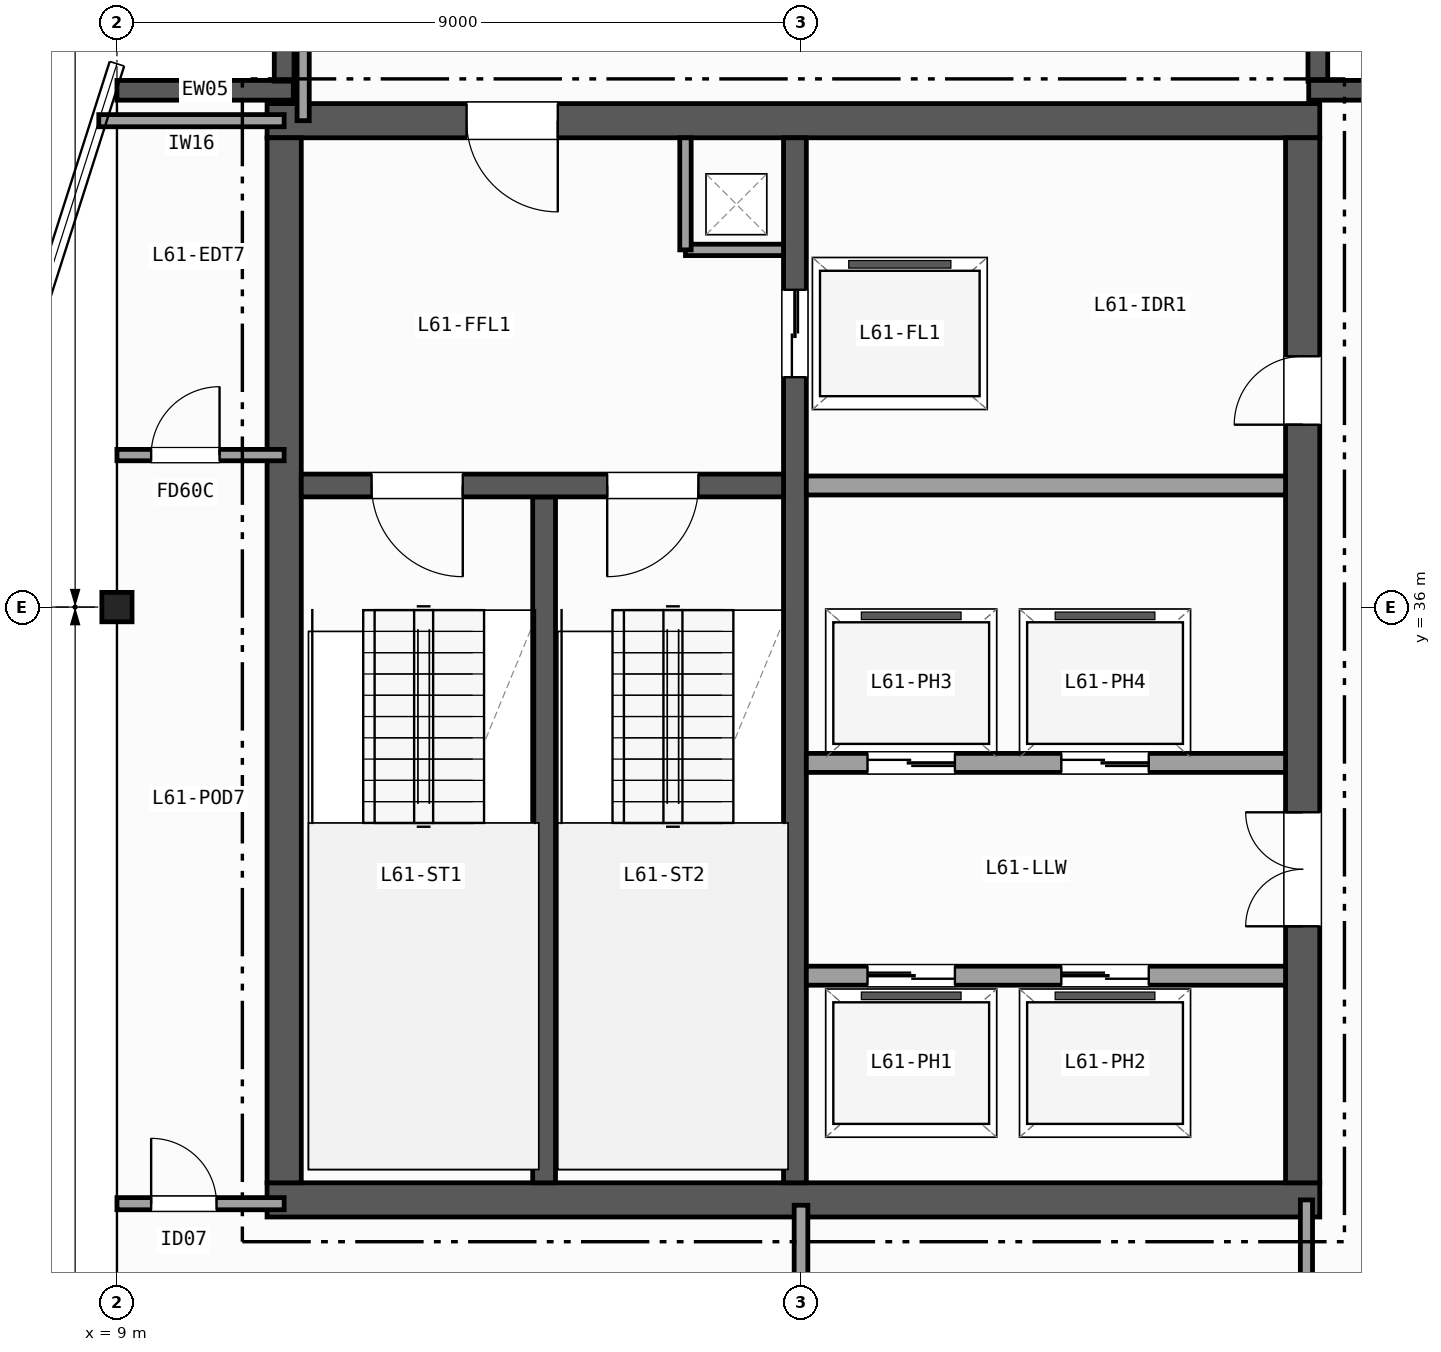
"""IFC4 building model, lengths in metres.
Left out: names, types, materials, properties, quantities, classifications, styles, units other than length and angle.
Written with IfcOpenShell. Run it as: python <this file> out.ifc"""

import sys

from ifc_helpers import new_model, si_unit, direction, frame, frame_2d, origin, origin_2d, place, context, subcontext, project, spatial, rectangle, i_section, extrude, element, fill, save


model = new_model("IFC4")
c1 = context("Model", 3, precision=1e-05, world=origin(), true_north=direction((0.0, 1.0)))
c2 = subcontext(c1, "Body", "Model", "MODEL_VIEW")
j1 = project(units=[si_unit("LENGTHUNIT", "METRE"), si_unit("PLANEANGLEUNIT", "RADIAN")], contexts=[c1])
p1 = place(None, origin())
s1 = spatial("IfcSite", under=j1, at=p1, CompositionType="ELEMENT")
p2 = place(p1, origin())
s2 = spatial("IfcBuilding", under=s1, at=p2, CompositionType="ELEMENT")
p3 = place(p2, frame((0.0, 0.0, 244.5)))
s3 = spatial("IfcBuildingStorey", under=s2, at=p3, CompositionType="ELEMENT", Elevation=244.5)
p4 = place(p3, frame((9.0, 36.0, 0.0), z_axis=(0.0, 0.0, 1.0), x_axis=(1.0, 0.0, 0.0)))
e1 = element("IfcColumn", 1, at=p4, inside=s3, PredefinedType="COLUMN", context=c2, shape_type="SweptSolid", body=[
    extrude(i_section(OverallWidth=0.397, OverallDepth=0.387, WebThickness=0.021, FlangeThickness=0.033, FilletRadius=0.015, at=origin_2d()), origin(), (0.0, 0.0, 1.0), 3.7),
])
p5 = place(p3, frame((9.0, 42.8, 0.0), z_axis=(0.0, 0.0, 1.0), x_axis=(1.0, 0.0, 0.0)))
e2 = element("IfcWall", 2, at=p5, inside=s3, PredefinedType="SOLIDWALL", context=c2, shape_type="SweptSolid", body=[
    extrude(rectangle(XDim=2.32, YDim=0.26, at=frame_2d((1.16, 0.0))), origin(), (0.0, 0.0, 1.0), 3.42),
])
for number, where, z_axis, x_axis in (
    (3, (11.2, 42.92, 0.0), (0.0, 0.0, 1.0), (0.0, 1.0, 0.0)),
    (4, (24.8, 45.0, 0.0), (0.0, 0.0, 1.0), (0.0, -1.0, 0.0)),
):
    element("IfcWall", number, at=place(p3, frame(where, z_axis=z_axis, x_axis=x_axis)), inside=s3, PredefinedType="SOLIDWALL", context=c2, shape_type="SweptSolid", body=[
        extrude(rectangle(XDim=2.08, YDim=0.26, at=frame_2d((1.04, 0.0))), origin(), (0.0, 0.0, 1.0), 3.42),
    ])
p6 = place(p3, frame((24.68, 42.8, 0.0), z_axis=(0.0, 0.0, 1.0), x_axis=(1.0, 0.0, 0.0)))
e5 = element("IfcWall", 5, at=p6, inside=s3, PredefinedType="SOLIDWALL", context=c2, shape_type="SweptSolid", body=[
    extrude(rectangle(XDim=2.32, YDim=0.26, at=frame_2d((1.16, 0.0))), origin(), (0.0, 0.0, 1.0), 3.42),
])
p7 = place(p3, frame((10.975, 28.2, 0.0), z_axis=(0.0, 0.0, 1.0), x_axis=(1.0, 0.0, 0.0)))
e6 = element("IfcWall", 6, at=p7, inside=s3, PredefinedType="SHEAR", context=c2, shape_type="SweptSolid", body=[
    extrude(rectangle(XDim=13.85, YDim=0.45, at=frame_2d((6.925, 0.0))), origin(), (0.0, 0.0, 1.0), 3.42),
])
p8 = place(p3, frame((24.825, 42.4, 0.0), z_axis=(0.0, 0.0, 1.0), x_axis=(-1.0, 0.0, 0.0)))
e7 = element("IfcWall", 7, at=p8, inside=s3, PredefinedType="SHEAR", context=c2, shape_type="SweptSolid", body=[
    extrude(rectangle(XDim=13.85, YDim=0.45, at=frame_2d((6.925, 0.0))), origin(), (0.0, 0.0, 1.0), 3.42),
])
p9 = place(p8, frame((10.025, 0.0, 0.0)))
e8 = element("IfcOpeningElement", 8, at=p9, cuts=e7, PredefinedType="OPENING", context=c2, shape_type="SweptSolid", body=[
    extrude(rectangle(XDim=1.2, YDim=2.15, at=frame_2d((0.6, 1.075))), frame((0.0, 0.235, 0.0), z_axis=(0.0, -1.0, 0.0), x_axis=(1.0, 0.0, 0.0)), (0.0, 0.0, 1.0), 0.47),
])
p10 = place(p3, frame((11.2, 42.175, 0.0), z_axis=(0.0, 0.0, 1.0), x_axis=(0.0, -1.0, 0.0)))
e9 = element("IfcWall", 9, at=p10, inside=s3, PredefinedType="SHEAR", context=c2, shape_type="SweptSolid", body=[
    extrude(rectangle(XDim=13.75, YDim=0.45, at=frame_2d((6.875, 0.0))), origin(), (0.0, 0.0, 1.0), 3.42),
])
p11 = place(p3, frame((24.6, 28.425, 0.0), z_axis=(0.0, 0.0, 1.0), x_axis=(0.0, 1.0, 0.0)))
e10 = element("IfcWall", 10, at=p11, inside=s3, PredefinedType="SHEAR", context=c2, shape_type="SweptSolid", body=[
    extrude(rectangle(XDim=13.75, YDim=0.45, at=frame_2d((6.875, 0.0))), origin(), (0.0, 0.0, 1.0), 3.42),
])
p12 = place(p11, frame((3.375, 0.0, 0.0)))
e11 = element("IfcOpeningElement", 11, at=p12, cuts=e10, PredefinedType="OPENING", context=c2, shape_type="SweptSolid", body=[
    extrude(rectangle(XDim=1.5, YDim=2.2, at=frame_2d((0.75, 1.1))), frame((0.0, 0.235, 0.0), z_axis=(0.0, -1.0, 0.0), x_axis=(1.0, 0.0, 0.0)), (0.0, 0.0, 1.0), 0.47),
])
p13 = place(p11, frame((9.975, 0.0, 0.0)))
e12 = element("IfcOpeningElement", 12, at=p13, cuts=e10, PredefinedType="OPENING", context=c2, shape_type="SweptSolid", body=[
    extrude(rectangle(XDim=0.9, YDim=2.1, at=frame_2d((0.45, 1.05))), frame((0.0, 0.235, 0.0), z_axis=(0.0, -1.0, 0.0), x_axis=(1.0, 0.0, 0.0)), (0.0, 0.0, 1.0), 0.47),
])
p14 = place(p3, frame((14.62, 28.425, 0.0), z_axis=(0.0, 0.0, 1.0), x_axis=(0.0, 1.0, 0.0)))
e13 = element("IfcWall", 13, at=p14, inside=s3, PredefinedType="SHEAR", context=c2, shape_type="SweptSolid", body=[
    extrude(rectangle(XDim=9.025, YDim=0.3, at=frame_2d((4.512, 0.0))), origin(), (0.0, 0.0, 1.0), 3.42),
])
p15 = place(p3, frame((17.92, 42.175, 0.0), z_axis=(0.0, 0.0, 1.0), x_axis=(0.0, -1.0, 0.0)))
e14 = element("IfcWall", 14, at=p15, inside=s3, PredefinedType="SHEAR", context=c2, shape_type="SweptSolid", body=[
    extrude(rectangle(XDim=13.75, YDim=0.3, at=frame_2d((6.875, 0.0))), origin(), (0.0, 0.0, 1.0), 3.42),
])
p16 = place(p15, frame((2.0, 0.0, 0.0)))
e15 = element("IfcOpeningElement", 15, at=p16, cuts=e14, PredefinedType="OPENING", context=c2, shape_type="SweptSolid", body=[
    extrude(rectangle(XDim=1.15, YDim=2.15, at=frame_2d((0.575, 1.075))), frame((0.0, 0.16, 0.0), z_axis=(0.0, -1.0, 0.0), x_axis=(1.0, 0.0, 0.0)), (0.0, 0.0, 1.0), 0.32),
])
p17 = place(p3, frame((17.77, 37.6, 0.0), z_axis=(0.0, 0.0, 1.0), x_axis=(-1.0, 0.0, 0.0)))
e16 = element("IfcWall", 16, at=p17, inside=s3, PredefinedType="SHEAR", context=c2, shape_type="SweptSolid", body=[
    extrude(rectangle(XDim=6.345, YDim=0.3, at=frame_2d((3.172, 0.0))), origin(), (0.0, 0.0, 1.0), 3.42),
])
p18 = place(p17, frame((4.22, 0.0, 0.0)))
e17 = element("IfcOpeningElement", 17, at=p18, cuts=e16, PredefinedType="OPENING", context=c2, shape_type="SweptSolid", body=[
    extrude(rectangle(XDim=1.2, YDim=2.15, at=frame_2d((0.6, 1.075))), frame((0.0, 0.16, 0.0), z_axis=(0.0, -1.0, 0.0), x_axis=(1.0, 0.0, 0.0)), (0.0, 0.0, 1.0), 0.32),
])
p19 = place(p17, frame((1.12, 0.0, 0.0)))
e18 = element("IfcOpeningElement", 18, at=p19, cuts=e16, PredefinedType="OPENING", context=c2, shape_type="SweptSolid", body=[
    extrude(rectangle(XDim=1.2, YDim=2.15, at=frame_2d((0.6, 1.075))), frame((0.0, 0.16, 0.0), z_axis=(0.0, -1.0, 0.0), x_axis=(1.0, 0.0, 0.0)), (0.0, 0.0, 1.0), 0.32),
])
p20 = place(p3, frame((16.48, 40.7, 0.0), z_axis=(0.0, 0.0, 1.0), x_axis=(1.0, 0.0, 0.0)))
e19 = element("IfcWall", 19, at=p20, inside=s3, PredefinedType="PARTITIONING", context=c2, shape_type="SweptSolid", body=[
    extrude(rectangle(XDim=1.29, YDim=0.15, at=frame_2d((0.645, 0.0))), origin(), (0.0, 0.0, 1.0), 3.42),
])
p21 = place(p3, frame((16.48, 40.7, 0.0), z_axis=(0.0, 0.0, 1.0), x_axis=(0.0, 1.0, 0.0)))
e20 = element("IfcWall", 20, at=p21, inside=s3, PredefinedType="PARTITIONING", context=c2, shape_type="SweptSolid", body=[
    extrude(rectangle(XDim=1.475, YDim=0.15, at=frame_2d((0.738, 0.0))), origin(), (0.0, 0.0, 1.0), 3.42),
])
p22 = place(p3, frame((18.07, 37.6, 0.0), z_axis=(0.0, 0.0, 1.0), x_axis=(1.0, 0.0, 0.0)))
e21 = element("IfcWall", 21, at=p22, inside=s3, PredefinedType="PARTITIONING", context=c2, shape_type="SweptSolid", body=[
    extrude(rectangle(XDim=6.305, YDim=0.25, at=frame_2d((3.152, 0.0))), origin(), (0.0, 0.0, 1.0), 3.42),
])
p23 = place(p3, frame((18.07, 31.15, 0.0), z_axis=(0.0, 0.0, 1.0), x_axis=(1.0, 0.0, 0.0)))
e22 = element("IfcWall", 22, at=p23, inside=s3, PredefinedType="PARTITIONING", context=c2, shape_type="SweptSolid", body=[
    extrude(rectangle(XDim=6.305, YDim=0.25, at=frame_2d((3.152, 0.0))), origin(), (0.0, 0.0, 1.0), 3.42),
])
p24 = place(p23, frame((0.805, 0.0, 0.0)))
e23 = element("IfcOpeningElement", 23, at=p24, cuts=e22, PredefinedType="OPENING", context=c2, shape_type="SweptSolid", body=[
    extrude(rectangle(XDim=1.15, YDim=2.15, at=frame_2d((0.575, 1.075))), frame((0.0, 0.135, 0.0), z_axis=(0.0, -1.0, 0.0), x_axis=(1.0, 0.0, 0.0)), (0.0, 0.0, 1.0), 0.27),
])
p25 = place(p23, frame((3.355, 0.0, 0.0)))
e24 = element("IfcOpeningElement", 24, at=p25, cuts=e22, PredefinedType="OPENING", context=c2, shape_type="SweptSolid", body=[
    extrude(rectangle(XDim=1.15, YDim=2.15, at=frame_2d((0.575, 1.075))), frame((0.0, 0.135, 0.0), z_axis=(0.0, -1.0, 0.0), x_axis=(1.0, 0.0, 0.0)), (0.0, 0.0, 1.0), 0.27),
])
p26 = place(p3, frame((24.375, 33.95, 0.0), z_axis=(0.0, 0.0, 1.0), x_axis=(-1.0, 0.0, 0.0)))
e25 = element("IfcWall", 25, at=p26, inside=s3, PredefinedType="PARTITIONING", context=c2, shape_type="SweptSolid", body=[
    extrude(rectangle(XDim=6.305, YDim=0.25, at=frame_2d((3.152, 0.0))), origin(), (0.0, 0.0, 1.0), 3.42),
])
p27 = place(p26, frame((4.35, 0.0, 0.0)))
e26 = element("IfcOpeningElement", 26, at=p27, cuts=e25, PredefinedType="OPENING", context=c2, shape_type="SweptSolid", body=[
    extrude(rectangle(XDim=1.15, YDim=2.15, at=frame_2d((0.575, 1.075))), frame((0.0, 0.135, 0.0), z_axis=(0.0, -1.0, 0.0), x_axis=(1.0, 0.0, 0.0)), (0.0, 0.0, 1.0), 0.27),
])
p28 = place(p26, frame((1.8, 0.0, 0.0)))
e27 = element("IfcOpeningElement", 27, at=p28, cuts=e25, PredefinedType="OPENING", context=c2, shape_type="SweptSolid", body=[
    extrude(rectangle(XDim=1.15, YDim=2.15, at=frame_2d((0.575, 1.075))), frame((0.0, 0.135, 0.0), z_axis=(0.0, -1.0, 0.0), x_axis=(1.0, 0.0, 0.0)), (0.0, 0.0, 1.0), 0.27),
])
p29 = place(p3, frame((9.0, 28.15, 0.0), z_axis=(0.0, 0.0, 1.0), x_axis=(1.0, 0.0, 0.0)))
e28 = element("IfcWall", 28, at=p29, inside=s3, PredefinedType="PARTITIONING", context=c2, shape_type="SweptSolid", body=[
    extrude(rectangle(XDim=2.2, YDim=0.16, at=frame_2d((1.1, 0.0))), origin(), (0.0, 0.0, 1.0), 2.707),
])
p30 = place(p29, frame((0.45, 0.0, 0.0)))
e29 = element("IfcOpeningElement", 29, at=p30, cuts=e28, PredefinedType="OPENING", context=c2, shape_type="SweptSolid", body=[
    extrude(rectangle(XDim=0.86, YDim=2.05, at=frame_2d((0.43, 1.025))), frame((0.0, 0.09, 0.0), z_axis=(0.0, -1.0, 0.0), x_axis=(1.0, 0.0, 0.0)), (0.0, 0.0, 1.0), 0.18),
])
p31 = place(p3, frame((8.761, 42.4, 0.0), z_axis=(0.0, 0.0, 1.0), x_axis=(1.0, 0.0, 0.0)))
e30 = element("IfcWall", 30, at=p31, inside=s3, PredefinedType="PARTITIONING", context=c2, shape_type="SweptSolid", body=[
    extrude(rectangle(XDim=2.439, YDim=0.16, at=frame_2d((1.219, 0.0))), origin(), (0.0, 0.0, 1.0), 3.42),
])
p32 = place(p3, frame((11.45, 42.4, 0.0), z_axis=(0.0, 0.0, 1.0), x_axis=(0.0, 1.0, 0.0)))
e31 = element("IfcWall", 31, at=p32, inside=s3, PredefinedType="PARTITIONING", context=c2, shape_type="SweptSolid", body=[
    extrude(rectangle(XDim=2.666, YDim=0.16, at=frame_2d((1.333, 0.0))), origin(), (0.0, 0.0, 1.0), 3.42),
])
p33 = place(p3, frame((9.0, 38.0, 0.0), z_axis=(0.0, 0.0, 1.0), x_axis=(1.0, 0.0, 0.0)))
e32 = element("IfcWall", 32, at=p33, inside=s3, PredefinedType="PARTITIONING", context=c2, shape_type="SweptSolid", body=[
    extrude(rectangle(XDim=2.2, YDim=0.15, at=frame_2d((1.1, 0.0))), origin(), (0.0, 0.0, 1.0), 3.42),
])
p34 = place(p33, frame((0.45, 0.0, 0.0)))
e33 = element("IfcOpeningElement", 33, at=p34, cuts=e32, PredefinedType="OPENING", context=c2, shape_type="SweptSolid", body=[
    extrude(rectangle(XDim=0.9, YDim=2.1, at=frame_2d((0.45, 1.05))), frame((0.0, 0.085, 0.0), z_axis=(0.0, -1.0, 0.0), x_axis=(1.0, 0.0, 0.0)), (0.0, 0.0, 1.0), 0.17),
])
p35 = place(p3, frame((24.65, 9.0, 0.0), z_axis=(0.0, 0.0, 1.0), x_axis=(0.0, 1.0, 0.0)))
e34 = element("IfcWall", 34, at=p35, inside=s3, PredefinedType="PARTITIONING", context=c2, shape_type="SweptSolid", body=[
    extrude(rectangle(XDim=19.2, YDim=0.16, at=frame_2d((9.6, 0.0))), origin(), (0.0, 0.0, 1.0), 2.707),
])
p36 = place(p35, frame((3.2, 0.0, 0.0)))
e35 = element("IfcOpeningElement", 35, at=p36, cuts=e34, PredefinedType="OPENING", context=c2, shape_type="SweptSolid", body=[
    extrude(rectangle(XDim=1.0, YDim=2.1, at=frame_2d((0.5, 1.05))), frame((0.0, 0.09, 0.0), z_axis=(0.0, -1.0, 0.0), x_axis=(1.0, 0.0, 0.0)), (0.0, 0.0, 1.0), 0.18),
])
p37 = place(p35, frame((12.765, 0.0, 0.0)))
e36 = element("IfcOpeningElement", 36, at=p37, cuts=e34, PredefinedType="OPENING", context=c2, shape_type="SweptSolid", body=[
    extrude(rectangle(XDim=1.05, YDim=2.15, at=frame_2d((0.525, 1.075))), frame((0.0, 0.09, 0.0), z_axis=(0.0, -1.0, 0.0), x_axis=(1.0, 0.0, 0.0)), (0.0, 0.0, 1.0), 0.18),
])
p38 = place(p3, frame((18.0, 9.0, 0.0), z_axis=(0.0, 0.0, 1.0), x_axis=(0.0, 1.0, 0.0)))
e37 = element("IfcWall", 37, at=p38, inside=s3, PredefinedType="PARTITIONING", context=c2, shape_type="SweptSolid", body=[
    extrude(rectangle(XDim=19.13, YDim=0.18, at=frame_2d((9.565, 0.0))), origin(), (0.0, 0.0, 1.0), 2.707),
])
p39 = place(p38, frame((2.2, 0.0, 0.0)))
e38 = element("IfcOpeningElement", 38, at=p39, cuts=e37, PredefinedType="OPENING", context=c2, shape_type="SweptSolid", body=[
    extrude(rectangle(XDim=1.2, YDim=2.15, at=frame_2d((0.6, 1.075))), frame((0.0, 0.1, 0.0), z_axis=(0.0, -1.0, 0.0), x_axis=(1.0, 0.0, 0.0)), (0.0, 0.0, 1.0), 0.2),
])
p40 = place(p38, frame((13.5, 0.0, 0.0)))
e39 = element("IfcOpeningElement", 39, at=p40, cuts=e37, PredefinedType="OPENING", context=c2, shape_type="SweptSolid", body=[
    extrude(rectangle(XDim=0.86, YDim=2.05, at=frame_2d((0.43, 1.025))), frame((0.0, 0.1, 0.0), z_axis=(0.0, -1.0, 0.0), x_axis=(1.0, 0.0, 0.0)), (0.0, 0.0, 1.0), 0.2),
])
p41 = place(p18, origin())
e40 = element("IfcDoor", 40, at=p41, inside=s3, OperationType="SINGLE_SWING_LEFT", PredefinedType="DOOR", context=c2, shape_type="SweptSolid", body=[
    extrude(rectangle(XDim=1.2, YDim=2.15, at=frame_2d((0.6, 1.075))), frame((0.0, 0.025, 0.0), z_axis=(0.0, -1.0, 0.0), x_axis=(1.0, 0.0, 0.0)), (0.0, 0.0, 1.0), 0.05),
])
fill(e17, e40)
p42 = place(p19, origin())
e41 = element("IfcDoor", 41, at=p42, inside=s3, OperationType="SINGLE_SWING_RIGHT", PredefinedType="DOOR", context=c2, shape_type="SweptSolid", body=[
    extrude(rectangle(XDim=1.2, YDim=2.15, at=frame_2d((0.6, 1.075))), frame((0.0, 0.025, 0.0), z_axis=(0.0, -1.0, 0.0), x_axis=(1.0, 0.0, 0.0)), (0.0, 0.0, 1.0), 0.05),
])
fill(e18, e41)
p43 = place(p12, origin())
e42 = element("IfcDoor", 42, at=p43, inside=s3, OperationType="DOUBLE_DOOR_SINGLE_SWING", PredefinedType="DOOR", context=c2, shape_type="SweptSolid", body=[
    extrude(rectangle(XDim=1.5, YDim=2.2, at=frame_2d((0.75, 1.1))), frame((0.0, 0.025, 0.0), z_axis=(0.0, -1.0, 0.0), x_axis=(1.0, 0.0, 0.0)), (0.0, 0.0, 1.0), 0.05),
])
fill(e11, e42)
p44 = place(p9, origin())
e43 = element("IfcDoor", 43, at=p44, inside=s3, OperationType="SINGLE_SWING_LEFT", PredefinedType="DOOR", context=c2, shape_type="SweptSolid", body=[
    extrude(rectangle(XDim=1.2, YDim=2.15, at=frame_2d((0.6, 1.075))), frame((0.0, 0.025, 0.0), z_axis=(0.0, -1.0, 0.0), x_axis=(1.0, 0.0, 0.0)), (0.0, 0.0, 1.0), 0.05),
])
fill(e8, e43)
p45 = place(p13, origin())
e44 = element("IfcDoor", 44, at=p45, inside=s3, OperationType="SINGLE_SWING_LEFT", PredefinedType="DOOR", context=c2, shape_type="SweptSolid", body=[
    extrude(rectangle(XDim=0.9, YDim=2.1, at=frame_2d((0.45, 1.05))), frame((0.0, 0.025, 0.0), z_axis=(0.0, -1.0, 0.0), x_axis=(1.0, 0.0, 0.0)), (0.0, 0.0, 1.0), 0.05),
])
fill(e12, e44)
p46 = place(p16, origin())
e45 = element("IfcDoor", 45, at=p46, inside=s3, OperationType="DOUBLE_DOOR_SLIDING", PredefinedType="DOOR", context=c2, shape_type="SweptSolid", body=[
    extrude(rectangle(XDim=1.15, YDim=2.15, at=frame_2d((0.575, 1.075))), frame((0.0, 0.025, 0.0), z_axis=(0.0, -1.0, 0.0), x_axis=(1.0, 0.0, 0.0)), (0.0, 0.0, 1.0), 0.05),
])
fill(e15, e45)
p47 = place(p24, origin())
e46 = element("IfcDoor", 46, at=p47, inside=s3, OperationType="DOUBLE_DOOR_SLIDING", PredefinedType="DOOR", context=c2, shape_type="SweptSolid", body=[
    extrude(rectangle(XDim=1.15, YDim=2.15, at=frame_2d((0.575, 1.075))), frame((0.0, 0.025, 0.0), z_axis=(0.0, -1.0, 0.0), x_axis=(1.0, 0.0, 0.0)), (0.0, 0.0, 1.0), 0.05),
])
fill(e23, e46)
p48 = place(p25, origin())
e47 = element("IfcDoor", 47, at=p48, inside=s3, OperationType="DOUBLE_DOOR_SLIDING", PredefinedType="DOOR", context=c2, shape_type="SweptSolid", body=[
    extrude(rectangle(XDim=1.15, YDim=2.15, at=frame_2d((0.575, 1.075))), frame((0.0, 0.025, 0.0), z_axis=(0.0, -1.0, 0.0), x_axis=(1.0, 0.0, 0.0)), (0.0, 0.0, 1.0), 0.05),
])
fill(e24, e47)
p49 = place(p27, origin())
e48 = element("IfcDoor", 48, at=p49, inside=s3, OperationType="DOUBLE_DOOR_SLIDING", PredefinedType="DOOR", context=c2, shape_type="SweptSolid", body=[
    extrude(rectangle(XDim=1.15, YDim=2.15, at=frame_2d((0.575, 1.075))), frame((0.0, 0.025, 0.0), z_axis=(0.0, -1.0, 0.0), x_axis=(1.0, 0.0, 0.0)), (0.0, 0.0, 1.0), 0.05),
])
fill(e26, e48)
p50 = place(p28, origin())
e49 = element("IfcDoor", 49, at=p50, inside=s3, OperationType="DOUBLE_DOOR_SLIDING", PredefinedType="DOOR", context=c2, shape_type="SweptSolid", body=[
    extrude(rectangle(XDim=1.15, YDim=2.15, at=frame_2d((0.575, 1.075))), frame((0.0, 0.025, 0.0), z_axis=(0.0, -1.0, 0.0), x_axis=(1.0, 0.0, 0.0)), (0.0, 0.0, 1.0), 0.05),
])
fill(e27, e49)
p51 = place(p30, origin())
e50 = element("IfcDoor", 50, at=p51, inside=s3, OperationType="SINGLE_SWING_LEFT", PredefinedType="DOOR", context=c2, shape_type="SweptSolid", body=[
    extrude(rectangle(XDim=0.86, YDim=2.05, at=frame_2d((0.43, 1.025))), frame((0.0, 0.025, 0.0), z_axis=(0.0, -1.0, 0.0), x_axis=(1.0, 0.0, 0.0)), (0.0, 0.0, 1.0), 0.05),
])
fill(e29, e50)
p52 = place(p34, origin())
e51 = element("IfcDoor", 51, at=p52, inside=s3, OperationType="SINGLE_SWING_RIGHT", PredefinedType="DOOR", context=c2, shape_type="SweptSolid", body=[
    extrude(rectangle(XDim=0.9, YDim=2.1, at=frame_2d((0.45, 1.05))), frame((0.0, 0.025, 0.0), z_axis=(0.0, -1.0, 0.0), x_axis=(1.0, 0.0, 0.0)), (0.0, 0.0, 1.0), 0.05),
])
fill(e33, e51)
save(model, sys.argv[1])
